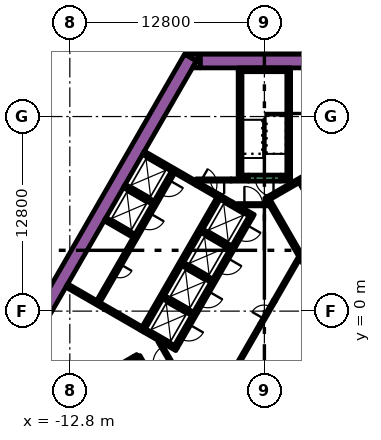
"""IFC4 building model, lengths in metres.
Left out: names, types, materials, properties, quantities, classifications, styles, units other than length and angle.
Written with IfcOpenShell. Run it as: python <this file> out.ifc"""

import sys

from ifc_helpers import new_model, si_unit, direction, frame, frame_2d, origin, place, context, subcontext, project, spatial, polyline, rectangle, outline, extrude, element, fill, save


model = new_model("IFC4")
c1 = context("Model", 3, precision=1e-05, world=origin(), true_north=direction((0.0, 1.0)))
c2 = subcontext(c1, "Body", "Model", "MODEL_VIEW")
j1 = project(units=[si_unit("LENGTHUNIT", "METRE"), si_unit("PLANEANGLEUNIT", "RADIAN")], contexts=[c1])
p1 = place(None, origin())
s1 = spatial("IfcSite", under=j1, at=p1, CompositionType="ELEMENT")
p2 = place(p1, origin())
s2 = spatial("IfcBuilding", under=s1, at=p2, CompositionType="ELEMENT")
p3 = place(p2, origin())
s3 = spatial("IfcBuildingStorey", under=s2, at=p3, CompositionType="ELEMENT", Elevation=0.0)
p4 = place(p3, frame((-15.36, -1.503, -1.8), z_axis=(0.0, 0.0, 1.0), x_axis=(0.50000389221, 0.866023156604, 0.0)))
e1 = element("IfcWall", 1, at=p4, inside=s3, PredefinedType="SOLIDWALL", context=c2, shape_type="SweptSolid", body=[
    extrude(rectangle(XDim=21.0, YDim=0.9, at=frame_2d((10.5, 0.0))), origin(), (0.0, 0.0, 1.0), 7.8),
])
p5 = place(p3, frame((0.0, 0.0, -1.8)))
e2 = element("IfcWall", 2, at=p5, inside=s3, PredefinedType="SOLIDWALL", context=c2, shape_type="SweptSolid", body=[
    extrude(outline(polyline([(-4.215, 16.9), (-4.469, 16.46), (-5.231, 16.9), (-4.215, 16.9)])), origin(), (0.0, 0.0, 1.0), 7.8),
])
p6 = place(p3, frame((-4.224, 16.45, -1.8), z_axis=(0.0, 0.0, 1.0), x_axis=(1.0, 0.0, 0.0)))
e3 = element("IfcWall", 3, at=p6, inside=s3, PredefinedType="SOLIDWALL", context=c2, shape_type="SweptSolid", body=[
    extrude(rectangle(XDim=9.488, YDim=0.9, at=frame_2d((4.744, 0.0))), origin(), (0.0, 0.0, 1.0), 7.8),
])
e4 = element("IfcWall", 4, at=p5, inside=s3, PredefinedType="SOLIDWALL", context=c2, shape_type="SweptSolid", body=[
    extrude(outline(polyline([(-4.734, 16.0), (-4.226, 16.88), (-4.226, 16.0), (-4.734, 16.0)])), origin(), (0.0, 0.0, 1.0), 7.8),
])
p7 = place(p3, frame((-1.725, 15.875, 0.0), z_axis=(0.0, 0.0, 1.0), x_axis=(1.0, 0.0, 0.0)))
e5 = element("IfcWall", 5, at=p7, inside=s3, PredefinedType="SOLIDWALL", context=c2, shape_type="SweptSolid", body=[
    extrude(rectangle(XDim=3.45, YDim=0.25, at=frame_2d((1.725, 0.0))), origin(), (0.0, 0.0, 1.0), 6.0),
])
p8 = place(p3, frame((1.6, 8.95, 0.0), z_axis=(0.0, 0.0, 1.0), x_axis=(0.0, 1.0, 0.0)))
e6 = element("IfcWall", 6, at=p8, inside=s3, PredefinedType="SOLIDWALL", context=c2, shape_type="SweptSolid", body=[
    extrude(rectangle(XDim=6.8, YDim=0.25, at=frame_2d((3.4, 0.0))), origin(), (0.0, 0.0, 1.0), 6.0),
])
p9 = place(p3, frame((1.05, 8.825, 0.0), z_axis=(0.0, 0.0, 1.0), x_axis=(1.0, 0.0, 0.0)))
e7 = element("IfcWall", 7, at=p9, inside=s3, PredefinedType="SOLIDWALL", context=c2, shape_type="SweptSolid", body=[
    extrude(rectangle(XDim=0.675, YDim=0.25, at=frame_2d((0.337, 0.0))), origin(), (0.0, 0.0, 1.0), 6.0),
])
p10 = place(p3, frame((-1.6, 8.7, 0.0), z_axis=(0.0, 0.0, 1.0), x_axis=(0.0, 1.0, 0.0)))
e8 = element("IfcWall", 8, at=p10, inside=s3, PredefinedType="SOLIDWALL", context=c2, shape_type="SweptSolid", body=[
    extrude(rectangle(XDim=7.05, YDim=0.25, at=frame_2d((3.525, 0.0))), origin(), (0.0, 0.0, 1.0), 6.0),
])
p11 = place(p3, frame((-1.475, 8.825, 0.0), z_axis=(0.0, 0.0, 1.0), x_axis=(1.0, 0.0, 0.0)))
e9 = element("IfcWall", 9, at=p11, inside=s3, PredefinedType="SOLIDWALL", context=c2, shape_type="SweptSolid", body=[
    extrude(rectangle(XDim=0.425, YDim=0.25, at=frame_2d((0.212, 0.0))), origin(), (0.0, 0.0, 1.0), 6.0),
])
p12 = place(p3, frame((-14.44, -6.49, 0.0), z_axis=(0.0, 0.0, 1.0), x_axis=(0.866022966069, 0.500004222222, 0.0)))
e10 = element("IfcWall", 10, at=p12, inside=s3, PredefinedType="SOLIDWALL", context=c2, shape_type="SweptSolid", body=[
    extrude(rectangle(XDim=6.8, YDim=0.25, at=frame_2d((3.4, 0.0))), origin(), (0.0, 0.0, 1.0), 6.0),
])
p13 = place(p3, frame((-8.168, -3.503, 0.0), z_axis=(0.0, 0.0, 1.0), x_axis=(-0.499952099219, 0.866053057547, 0.0)))
e11 = element("IfcWall", 11, at=p13, inside=s3, PredefinedType="SOLIDWALL", context=c2, shape_type="SweptSolid", body=[
    extrude(rectangle(XDim=0.675, YDim=0.25, at=frame_2d((0.337, 0.0))), origin(), (0.0, 0.0, 1.0), 6.0),
])
e12 = element("IfcWall", 12, at=p5, inside=s3, PredefinedType="SOLIDWALL", context=c2, shape_type="SweptSolid", body=[
    extrude(outline(polyline([(0.335, 6.925), (0.335, 7.075), (0.335, 7.075), (0.335, 7.075), (0.245, 7.075), (0.079, 7.363), (0.035, 7.439), (0.252, 7.564), (0.377, 7.348), (6.552, -3.348), (6.677, -3.564), (6.46, -3.689), (4.897, -0.981), (0.332, 6.925), (0.335, 6.925), (0.335, 6.925), (0.335, 6.925)])), origin(), (0.0, 0.0, 1.0), 7.8),
])
p14 = place(p3, frame((0.314, 7.456, -1.8), z_axis=(0.0, 0.0, 1.0), x_axis=(0.866013897511, 0.50001992892, 0.0)))
e13 = element("IfcWall", 13, at=p14, inside=s3, PredefinedType="SOLIDWALL", context=c2, shape_type="SweptSolid", body=[
    extrude(rectangle(XDim=3.268, YDim=0.25, at=frame_2d((1.634, 0.0))), origin(), (0.0, 0.0, 1.0), 7.8),
])
p15 = place(p3, frame((-8.06, -1.311, -1.8), z_axis=(0.0, 0.0, 1.0), x_axis=(0.50000273126, 0.866023826885, 0.0)))
e14 = element("IfcWall", 14, at=p15, inside=s3, PredefinedType="SOLIDWALL", context=c2, shape_type="SweptSolid", body=[
    extrude(rectangle(XDim=10.33, YDim=0.25, at=frame_2d((5.165, 0.0))), origin(), (0.0, 0.0, 1.0), 7.8),
])
p16 = place(p3, frame((-1.819, 6.87, -1.8), z_axis=(0.0, 0.0, 1.0), x_axis=(-0.866294599386, 0.499533449405, 0.0)))
e15 = element("IfcWall", 15, at=p16, inside=s3, PredefinedType="SOLIDWALL", context=c2, shape_type="SweptSolid", body=[
    extrude(rectangle(XDim=0.41, YDim=0.25, at=frame_2d((0.205, 0.0))), origin(), (0.0, 0.0, 1.0), 7.8),
])
p17 = place(p3, frame((-2.849, 7.465, -1.8), z_axis=(0.0, 0.0, 1.0), x_axis=(0.865955664968, -0.500120771724, 0.0)))
e16 = element("IfcWall", 16, at=p17, inside=s3, PredefinedType="SOLIDWALL", context=c2, shape_type="SweptSolid", body=[
    extrude(rectangle(XDim=0.778, YDim=0.25, at=frame_2d((0.389, 0.0))), origin(), (0.0, 0.0, 1.0), 7.8),
])
p18 = place(p3, frame((-0.728, 6.24, -1.8), z_axis=(0.0, 0.0, 1.0), x_axis=(-0.866002680491, 0.500039355833, 0.0)))
e17 = element("IfcWall", 17, at=p18, inside=s3, PredefinedType="SOLIDWALL", context=c2, shape_type="SweptSolid", body=[
    extrude(rectangle(XDim=1.178, YDim=0.25, at=frame_2d((0.589, 0.0))), origin(), (0.0, 0.0, 1.0), 7.8),
])
for number, where, z_axis, x_axis in (
    (18, (-2.204, 4.182, -1.8), (0.0, 0.0, 1.0), (-0.866, 0.5, 0.0)),
    (19, (-5.369, 3.1, -1.8), (0.0, 0.0, 1.0), (0.866, -0.5, 0.0)),
    (20, (-4.724, -0.182, -1.8), (0.0, 0.0, 1.0), (-0.866, 0.5, 0.0)),
):
    element("IfcWall", number, at=place(p3, frame(where, z_axis=z_axis, x_axis=x_axis)), inside=s3, PredefinedType="SOLIDWALL", context=c2, shape_type="SweptSolid", body=[
        extrude(rectangle(XDim=2.2, YDim=0.25, at=frame_2d((1.1, 0.0))), origin(), (0.0, 0.0, 1.0), 7.8),
    ])
e21 = element("IfcWall", 21, at=p5, inside=s3, PredefinedType="SOLIDWALL", context=c2, shape_type="SweptSolid", body=[
    extrude(outline(polyline([(-5.922, -2.257), (-5.922, -2.257), (-5.705, -2.382), (-5.83, -2.598), (-6.829, -2.021), (-6.88, -1.934), (-6.88, -1.934), (-6.93, -1.963), (-7.952, -1.373), (-7.827, -1.156), (-5.922, -2.257)])), origin(), (0.0, 0.0, 1.0), 7.8),
])
p19 = place(p3, frame((-8.106, -1.14, -1.8), z_axis=(0.0, 0.0, 1.0), x_axis=(-0.866000643155, 0.500042884217, 0.0)))
e22 = element("IfcWall", 22, at=p19, inside=s3, PredefinedType="SOLIDWALL", context=c2, shape_type="SweptSolid", body=[
    extrude(rectangle(XDim=5.65, YDim=0.25, at=frame_2d((2.825, 0.0))), origin(), (0.0, 0.0, 1.0), 7.8),
])
e23 = element("IfcWall", 23, at=p5, inside=s3, PredefinedType="SOLIDWALL", context=c2, shape_type="SweptSolid", body=[
    extrude(outline(polyline([(-3.128, 7.481), (-3.259, 7.557), (-3.134, 7.773), (-3.003, 7.698), (-3.128, 7.481)])), origin(), (0.0, 0.0, 1.0), 7.8),
])
for number, where, z_axis, x_axis in (
    (24, (-8.574, 4.95, -1.8), (0.0, 0.0, 1.0), (-0.866, 0.5, 0.0)),
    (25, (-7.314, 7.132, -1.8), (0.0, 0.0, 1.0), (-0.866, 0.5, 0.0)),
):
    element("IfcWall", number, at=place(p3, frame(where, z_axis=z_axis, x_axis=x_axis)), inside=s3, PredefinedType="SOLIDWALL", context=c2, shape_type="SweptSolid", body=[
        extrude(rectangle(XDim=2.2, YDim=0.25, at=frame_2d((1.1, 0.0))), origin(), (0.0, 0.0, 1.0), 7.8),
    ])
p20 = place(p3, frame((-7.959, 10.415, -1.8), z_axis=(0.0, 0.0, 1.0), x_axis=(0.866020958405, -0.500007699544, 0.0)))
e26 = element("IfcWall", 26, at=p20, inside=s3, PredefinedType="SOLIDWALL", context=c2, shape_type="SweptSolid", body=[
    extrude(rectangle(XDim=4.1, YDim=0.25, at=frame_2d((2.05, 0.0))), origin(), (0.0, 0.0, 1.0), 7.8),
])
p21 = place(p3, frame((-8.252, -2.958, 0.0), z_axis=(0.0, 0.0, 1.0), x_axis=(0.500174715838, -0.865924508047, 0.0)))
e27 = element("IfcWall", 27, at=p21, inside=s3, PredefinedType="PARTITIONING", context=c2, shape_type="SweptSolid", body=[
    extrude(rectangle(XDim=0.514, YDim=0.15, at=frame_2d((0.257, 0.0))), origin(), (0.0, 0.0, 1.0), 5.1),
])
p22 = place(p3, frame((-3.997, 8.625, 0.0), z_axis=(0.0, 0.0, 1.0), x_axis=(-1.0, 0.0, 0.0)))
e28 = element("IfcWall", 28, at=p22, inside=s3, PredefinedType="PARTITIONING", context=c2, shape_type="SweptSolid", body=[
    extrude(rectangle(XDim=0.502, YDim=0.15, at=frame_2d((0.251, 0.0))), origin(), (0.0, 0.0, 1.0), 5.1),
])
p23 = place(p3, frame((-2.196, 8.625, 0.0), z_axis=(0.0, 0.0, 1.0), x_axis=(1.0, 0.0, 0.0)))
e29 = element("IfcWall", 29, at=p23, inside=s3, PredefinedType="PARTITIONING", context=c2, shape_type="SweptSolid", body=[
    extrude(rectangle(XDim=1.146, YDim=0.15, at=frame_2d((0.573, 0.0))), origin(), (0.0, 0.0, 1.0), 5.1),
])
for number, where, z_axis, x_axis in (
    (30, (-1.887, -3.718, 0.0), (0.0, 0.0, 1.0), (0.5, 0.866, 0.0)),
    (31, (0.645, 0.667, 0.0), (0.0, 0.0, 1.0), (0.5, 0.866, 0.0)),
):
    element("IfcWall", number, at=place(p3, frame(where, z_axis=z_axis, x_axis=x_axis)), inside=s3, PredefinedType="PARTITIONING", context=c2, shape_type="SweptSolid", body=[
        extrude(rectangle(XDim=3.263, YDim=0.15, at=frame_2d((1.632, 0.0))), origin(), (0.0, 0.0, 1.0), 5.1),
    ])
p24 = place(p3, frame((1.05, 8.625, 0.0), z_axis=(0.0, 0.0, 1.0), x_axis=(1.0, 0.0, 0.0)))
e32 = element("IfcWall", 32, at=p24, inside=s3, PredefinedType="PARTITIONING", context=c2, shape_type="SweptSolid", body=[
    extrude(rectangle(XDim=0.514, YDim=0.15, at=frame_2d((0.257, 0.0))), origin(), (0.0, 0.0, 1.0), 5.1),
])
p25 = place(p3, frame((8.565, -2.185, -1.8), z_axis=(0.0, 0.0, 1.0), x_axis=(-0.499997954832, 0.866026584559, 0.0)))
e33 = element("IfcWall", 33, at=p25, inside=s3, PredefinedType="SOLIDWALL", context=c2, shape_type="SweptSolid", body=[
    extrude(rectangle(XDim=12.35, YDim=0.25, at=frame_2d((6.175, 0.0))), origin(), (0.0, 0.0, 1.0), 7.8),
])
p26 = place(p25, frame((5.725, 0.0, 1.8)))
e34 = element("IfcOpeningElement", 34, at=p26, cuts=e33, PredefinedType="OPENING", context=c2, shape_type="SweptSolid", body=[
    extrude(rectangle(XDim=0.9, YDim=2.1, at=frame_2d((0.45, 1.05))), frame((0.0, 0.135, 0.0), z_axis=(0.0, -1.0, 0.0), x_axis=(1.0, 0.0, 0.0)), (0.0, 0.0, 1.0), 0.27),
])
p27 = place(p3, frame((-6.008, 9.144, -1.8), z_axis=(0.0, 0.0, 1.0), x_axis=(-0.500006956611, -0.866021387346, 0.0)))
e35 = element("IfcWall", 35, at=p27, inside=s3, PredefinedType="SOLIDWALL", context=c2, shape_type="SweptSolid", body=[
    extrude(rectangle(XDim=9.83, YDim=0.25, at=frame_2d((4.915, 0.0))), origin(), (0.0, 0.0, 1.0), 7.8),
])
p28 = place(p27, frame((0.585, 0.0, 1.8)))
e36 = element("IfcOpeningElement", 36, at=p28, cuts=e35, PredefinedType="OPENING", context=c2, shape_type="SweptSolid", body=[
    extrude(rectangle(XDim=1.1, YDim=2.1, at=frame_2d((0.55, 1.05))), frame((0.0, 0.135, 0.0), z_axis=(0.0, -1.0, 0.0), x_axis=(1.0, 0.0, 0.0)), (0.0, 0.0, 1.0), 0.27),
])
p29 = place(p27, frame((3.105, 0.0, 1.8)))
e37 = element("IfcOpeningElement", 37, at=p29, cuts=e35, PredefinedType="OPENING", context=c2, shape_type="SweptSolid", body=[
    extrude(rectangle(XDim=1.1, YDim=2.1, at=frame_2d((0.55, 1.05))), frame((0.0, 0.135, 0.0), z_axis=(0.0, -1.0, 0.0), x_axis=(1.0, 0.0, 0.0)), (0.0, 0.0, 1.0), 0.27),
])
p30 = place(p27, frame((6.985, 0.0, 1.8)))
e38 = element("IfcOpeningElement", 38, at=p30, cuts=e35, PredefinedType="OPENING", context=c2, shape_type="SweptSolid", body=[
    extrude(rectangle(XDim=0.9, YDim=2.1, at=frame_2d((0.45, 1.05))), frame((0.0, 0.135, 0.0), z_axis=(0.0, -1.0, 0.0), x_axis=(1.0, 0.0, 0.0)), (0.0, 0.0, 1.0), 0.27),
])
p31 = place(p3, frame((-0.898, 6.194, -1.8), z_axis=(0.0, 0.0, 1.0), x_axis=(-0.499996202215, -0.866027596426, 0.0)))
e39 = element("IfcWall", 39, at=p31, inside=s3, PredefinedType="SOLIDWALL", context=c2, shape_type="SweptSolid", body=[
    extrude(rectangle(XDim=9.83, YDim=0.25, at=frame_2d((4.915, 0.0))), origin(), (0.0, 0.0, 1.0), 7.8),
])
p32 = place(p31, frame((0.585, 0.0, 1.8)))
e40 = element("IfcOpeningElement", 40, at=p32, cuts=e39, PredefinedType="OPENING", context=c2, shape_type="SweptSolid", body=[
    extrude(rectangle(XDim=1.1, YDim=2.1, at=frame_2d((0.55, 1.05))), frame((0.0, 0.135, 0.0), z_axis=(0.0, -1.0, 0.0), x_axis=(1.0, 0.0, 0.0)), (0.0, 0.0, 1.0), 0.27),
])
p33 = place(p31, frame((3.105, 0.0, 1.8)))
e41 = element("IfcOpeningElement", 41, at=p33, cuts=e39, PredefinedType="OPENING", context=c2, shape_type="SweptSolid", body=[
    extrude(rectangle(XDim=1.1, YDim=2.1, at=frame_2d((0.55, 1.05))), frame((0.0, 0.135, 0.0), z_axis=(0.0, -1.0, 0.0), x_axis=(1.0, 0.0, 0.0)), (0.0, 0.0, 1.0), 0.27),
])
p34 = place(p31, frame((5.625, 0.0, 1.8)))
e42 = element("IfcOpeningElement", 42, at=p34, cuts=e39, PredefinedType="OPENING", context=c2, shape_type="SweptSolid", body=[
    extrude(rectangle(XDim=1.1, YDim=2.1, at=frame_2d((0.55, 1.05))), frame((0.0, 0.135, 0.0), z_axis=(0.0, -1.0, 0.0), x_axis=(1.0, 0.0, 0.0)), (0.0, 0.0, 1.0), 0.27),
])
p35 = place(p31, frame((8.145, 0.0, 1.8)))
e43 = element("IfcOpeningElement", 43, at=p35, cuts=e39, PredefinedType="OPENING", context=c2, shape_type="SweptSolid", body=[
    extrude(rectangle(XDim=1.1, YDim=2.1, at=frame_2d((0.55, 1.05))), frame((0.0, 0.135, 0.0), z_axis=(0.0, -1.0, 0.0), x_axis=(1.0, 0.0, 0.0)), (0.0, 0.0, 1.0), 0.27),
])
p36 = place(p3, frame((1.05, 8.75, 0.0), z_axis=(0.0, 0.0, 1.0), x_axis=(-1.0, 0.0, 0.0)))
e44 = element("IfcWall", 44, at=p36, inside=s3, PredefinedType="SOLIDWALL", context=c2, shape_type="SweptSolid", body=[
    extrude(rectangle(XDim=2.1, YDim=0.4, at=frame_2d((1.05, 0.0))), origin(), (0.0, 0.0, 1.0), 6.0),
])
p37 = place(p36, frame((0.45, 0.0, 0.0)))
e45 = element("IfcOpeningElement", 45, at=p37, cuts=e44, PredefinedType="OPENING", context=c2, shape_type="SweptSolid", body=[
    extrude(rectangle(XDim=1.2, YDim=2.1, at=frame_2d((0.6, 1.05))), frame((0.0, 0.21, 0.0), z_axis=(0.0, -1.0, 0.0), x_axis=(1.0, 0.0, 0.0)), (0.0, 0.0, 1.0), 0.42),
])
p38 = place(p3, frame((-2.196, 8.625, 0.0), z_axis=(0.0, 0.0, 1.0), x_axis=(-1.0, 0.0, 0.0)))
e46 = element("IfcWall", 46, at=p38, inside=s3, PredefinedType="PARTITIONING", context=c2, shape_type="SweptSolid", body=[
    extrude(rectangle(XDim=1.8, YDim=0.15, at=frame_2d((0.9, 0.0))), origin(), (0.0, 0.0, 1.0), 5.1),
])
p39 = place(p38, frame((0.45, 0.0, 0.0)))
e47 = element("IfcOpeningElement", 47, at=p39, cuts=e46, PredefinedType="OPENING", context=c2, shape_type="SweptSolid", body=[
    extrude(rectangle(XDim=0.9, YDim=2.1, at=frame_2d((0.45, 1.05))), frame((0.0, 0.085, 0.0), z_axis=(0.0, -1.0, 0.0), x_axis=(1.0, 0.0, 0.0)), (0.0, 0.0, 1.0), 0.17),
])
p40 = place(p3, frame((-1.765, 7.0, 0.0), z_axis=(0.0, 0.0, 1.0), x_axis=(1.0, 0.0, 0.0)))
e48 = element("IfcWall", 48, at=p40, inside=s3, PredefinedType="PARTITIONING", context=c2, shape_type="SweptSolid", body=[
    extrude(rectangle(XDim=2.1, YDim=0.15, at=frame_2d((1.05, 0.0))), origin(), (0.0, 0.0, 1.0), 5.1),
])
p41 = place(p40, frame((0.45, 0.0, 0.0)))
e49 = element("IfcOpeningElement", 49, at=p41, cuts=e48, PredefinedType="OPENING", context=c2, shape_type="SweptSolid", body=[
    extrude(rectangle(XDim=1.2, YDim=2.1, at=frame_2d((0.6, 1.05))), frame((0.0, 0.085, 0.0), z_axis=(0.0, -1.0, 0.0), x_axis=(1.0, 0.0, 0.0)), (0.0, 0.0, 1.0), 0.17),
])
p42 = place(p3, frame((-5.895, -3.79, 0.0), z_axis=(0.0, 0.0, 1.0), x_axis=(-0.49994051562, 0.866059744384, 0.0)))
e50 = element("IfcWall", 50, at=p42, inside=s3, PredefinedType="PARTITIONING", context=c2, shape_type="SweptSolid", body=[
    extrude(rectangle(XDim=2.1, YDim=0.15, at=frame_2d((1.05, 0.0))), origin(), (0.0, 0.0, 1.0), 5.1),
])
p43 = place(p42, frame((0.45, 0.0, 0.0)))
e51 = element("IfcOpeningElement", 51, at=p43, cuts=e50, PredefinedType="OPENING", context=c2, shape_type="SweptSolid", body=[
    extrude(rectangle(XDim=1.2, YDim=2.1, at=frame_2d((0.6, 1.05))), frame((0.0, 0.085, 0.0), z_axis=(0.0, -1.0, 0.0), x_axis=(1.0, 0.0, 0.0)), (0.0, 0.0, 1.0), 0.17),
])
p44 = place(p3, frame((-4.409, 8.365, -1.8), z_axis=(0.0, 0.0, 1.0), x_axis=(0.866034573852, -0.49998411664, 0.0)))
e52 = element("IfcWall", 52, at=p44, inside=s3, PredefinedType="SOLIDWALL", context=c2, shape_type="SweptSolid", body=[
    extrude(rectangle(XDim=1.4, YDim=0.25, at=frame_2d((0.7, 0.0))), origin(), (0.0, 0.0, 1.0), 7.8),
])
p45 = place(p44, frame((0.1, 0.0, 1.8)))
e53 = element("IfcOpeningElement", 53, at=p45, cuts=e52, PredefinedType="OPENING", context=c2, shape_type="SweptSolid", body=[
    extrude(rectangle(XDim=1.2, YDim=2.1, at=frame_2d((0.6, 1.05))), frame((0.0, 0.135, 0.0), z_axis=(0.0, -1.0, 0.0), x_axis=(1.0, 0.0, 0.0)), (0.0, 0.0, 1.0), 0.27),
])
p46 = place(p3, frame((-0.255, -0.892, 0.0), z_axis=(0.0, 0.0, 1.0), x_axis=(0.500062916607, 0.865989075817, 0.0)))
e54 = element("IfcWall", 54, at=p46, inside=s3, PredefinedType="PARTITIONING", context=c2, shape_type="SweptSolid", body=[
    extrude(rectangle(XDim=1.8, YDim=0.15, at=frame_2d((0.9, 0.0))), origin(), (0.0, 0.0, 1.0), 5.1),
])
p47 = place(p46, frame((0.45, 0.0, 0.0)))
e55 = element("IfcOpeningElement", 55, at=p47, cuts=e54, PredefinedType="OPENING", context=c2, shape_type="SweptSolid", body=[
    extrude(rectangle(XDim=0.9, YDim=2.1, at=frame_2d((0.45, 1.05))), frame((0.0, 0.085, 0.0), z_axis=(0.0, -1.0, 0.0), x_axis=(1.0, 0.0, 0.0)), (0.0, 0.0, 1.0), 0.17),
])
p48 = place(p28, origin())
e56 = element("IfcDoor", 56, at=p48, inside=s3, OperationType="DOUBLE_DOOR_SLIDING", PredefinedType="DOOR", context=c2, shape_type="SweptSolid", body=[
    extrude(rectangle(XDim=1.1, YDim=2.1, at=frame_2d((0.55, 1.05))), frame((0.0, 0.025, 0.0), z_axis=(0.0, -1.0, 0.0), x_axis=(1.0, 0.0, 0.0)), (0.0, 0.0, 1.0), 0.05),
])
fill(e36, e56)
p49 = place(p29, origin())
e57 = element("IfcDoor", 57, at=p49, inside=s3, OperationType="DOUBLE_DOOR_SLIDING", PredefinedType="DOOR", context=c2, shape_type="SweptSolid", body=[
    extrude(rectangle(XDim=1.1, YDim=2.1, at=frame_2d((0.55, 1.05))), frame((0.0, 0.025, 0.0), z_axis=(0.0, -1.0, 0.0), x_axis=(1.0, 0.0, 0.0)), (0.0, 0.0, 1.0), 0.05),
])
fill(e37, e57)
p50 = place(p30, origin())
e58 = element("IfcDoor", 58, at=p50, inside=s3, OperationType="SINGLE_SWING_LEFT", PredefinedType="DOOR", context=c2, shape_type="SweptSolid", body=[
    extrude(rectangle(XDim=0.9, YDim=2.1, at=frame_2d((0.45, 1.05))), frame((0.0, 0.025, 0.0), z_axis=(0.0, -1.0, 0.0), x_axis=(1.0, 0.0, 0.0)), (0.0, 0.0, 1.0), 0.05),
])
fill(e38, e58)
p51 = place(p32, origin())
e59 = element("IfcDoor", 59, at=p51, inside=s3, OperationType="DOUBLE_DOOR_SLIDING", PredefinedType="DOOR", context=c2, shape_type="SweptSolid", body=[
    extrude(rectangle(XDim=1.1, YDim=2.1, at=frame_2d((0.55, 1.05))), frame((0.0, 0.025, 0.0), z_axis=(0.0, -1.0, 0.0), x_axis=(1.0, 0.0, 0.0)), (0.0, 0.0, 1.0), 0.05),
])
fill(e40, e59)
p52 = place(p33, origin())
e60 = element("IfcDoor", 60, at=p52, inside=s3, OperationType="DOUBLE_DOOR_SLIDING", PredefinedType="DOOR", context=c2, shape_type="SweptSolid", body=[
    extrude(rectangle(XDim=1.1, YDim=2.1, at=frame_2d((0.55, 1.05))), frame((0.0, 0.025, 0.0), z_axis=(0.0, -1.0, 0.0), x_axis=(1.0, 0.0, 0.0)), (0.0, 0.0, 1.0), 0.05),
])
fill(e41, e60)
p53 = place(p34, origin())
e61 = element("IfcDoor", 61, at=p53, inside=s3, OperationType="DOUBLE_DOOR_SLIDING", PredefinedType="DOOR", context=c2, shape_type="SweptSolid", body=[
    extrude(rectangle(XDim=1.1, YDim=2.1, at=frame_2d((0.55, 1.05))), frame((0.0, 0.025, 0.0), z_axis=(0.0, -1.0, 0.0), x_axis=(1.0, 0.0, 0.0)), (0.0, 0.0, 1.0), 0.05),
])
fill(e42, e61)
p54 = place(p35, origin())
e62 = element("IfcDoor", 62, at=p54, inside=s3, OperationType="DOUBLE_DOOR_SLIDING", PredefinedType="DOOR", context=c2, shape_type="SweptSolid", body=[
    extrude(rectangle(XDim=1.1, YDim=2.1, at=frame_2d((0.55, 1.05))), frame((0.0, 0.025, 0.0), z_axis=(0.0, -1.0, 0.0), x_axis=(1.0, 0.0, 0.0)), (0.0, 0.0, 1.0), 0.05),
])
fill(e43, e62)
p55 = place(p37, origin())
e63 = element("IfcDoor", 63, at=p55, inside=s3, OperationType="SINGLE_SWING_LEFT", PredefinedType="DOOR", context=c2, shape_type="SweptSolid", body=[
    extrude(rectangle(XDim=1.2, YDim=2.1, at=frame_2d((0.6, 1.05))), frame((0.0, 0.025, 0.0), z_axis=(0.0, -1.0, 0.0), x_axis=(1.0, 0.0, 0.0)), (0.0, 0.0, 1.0), 0.05),
])
fill(e45, e63)
p56 = place(p39, origin())
e64 = element("IfcDoor", 64, at=p56, inside=s3, OperationType="SINGLE_SWING_LEFT", PredefinedType="DOOR", context=c2, shape_type="SweptSolid", body=[
    extrude(rectangle(XDim=0.9, YDim=2.1, at=frame_2d((0.45, 1.05))), frame((0.0, 0.025, 0.0), z_axis=(0.0, -1.0, 0.0), x_axis=(1.0, 0.0, 0.0)), (0.0, 0.0, 1.0), 0.05),
])
fill(e47, e64)
p57 = place(p41, origin())
e65 = element("IfcDoor", 65, at=p57, inside=s3, OperationType="SINGLE_SWING_LEFT", PredefinedType="DOOR", context=c2, shape_type="SweptSolid", body=[
    extrude(rectangle(XDim=1.2, YDim=2.1, at=frame_2d((0.6, 1.05))), frame((0.0, 0.025, 0.0), z_axis=(0.0, -1.0, 0.0), x_axis=(1.0, 0.0, 0.0)), (0.0, 0.0, 1.0), 0.05),
])
fill(e49, e65)
p58 = place(p43, origin())
e66 = element("IfcDoor", 66, at=p58, inside=s3, OperationType="SINGLE_SWING_LEFT", PredefinedType="DOOR", context=c2, shape_type="SweptSolid", body=[
    extrude(rectangle(XDim=1.2, YDim=2.1, at=frame_2d((0.6, 1.05))), frame((0.0, 0.025, 0.0), z_axis=(0.0, -1.0, 0.0), x_axis=(1.0, 0.0, 0.0)), (0.0, 0.0, 1.0), 0.05),
])
fill(e51, e66)
p59 = place(p45, origin())
e67 = element("IfcDoor", 67, at=p59, inside=s3, OperationType="SINGLE_SWING_LEFT", PredefinedType="DOOR", context=c2, shape_type="SweptSolid", body=[
    extrude(rectangle(XDim=1.2, YDim=2.1, at=frame_2d((0.6, 1.05))), frame((0.0, 0.025, 0.0), z_axis=(0.0, -1.0, 0.0), x_axis=(1.0, 0.0, 0.0)), (0.0, 0.0, 1.0), 0.05),
])
fill(e53, e67)
p60 = place(p47, origin())
e68 = element("IfcDoor", 68, at=p60, inside=s3, OperationType="SINGLE_SWING_LEFT", PredefinedType="DOOR", context=c2, shape_type="SweptSolid", body=[
    extrude(rectangle(XDim=0.9, YDim=2.1, at=frame_2d((0.45, 1.05))), frame((0.0, 0.025, 0.0), z_axis=(0.0, -1.0, 0.0), x_axis=(1.0, 0.0, 0.0)), (0.0, 0.0, 1.0), 0.05),
])
fill(e55, e68)
save(model, sys.argv[1])
